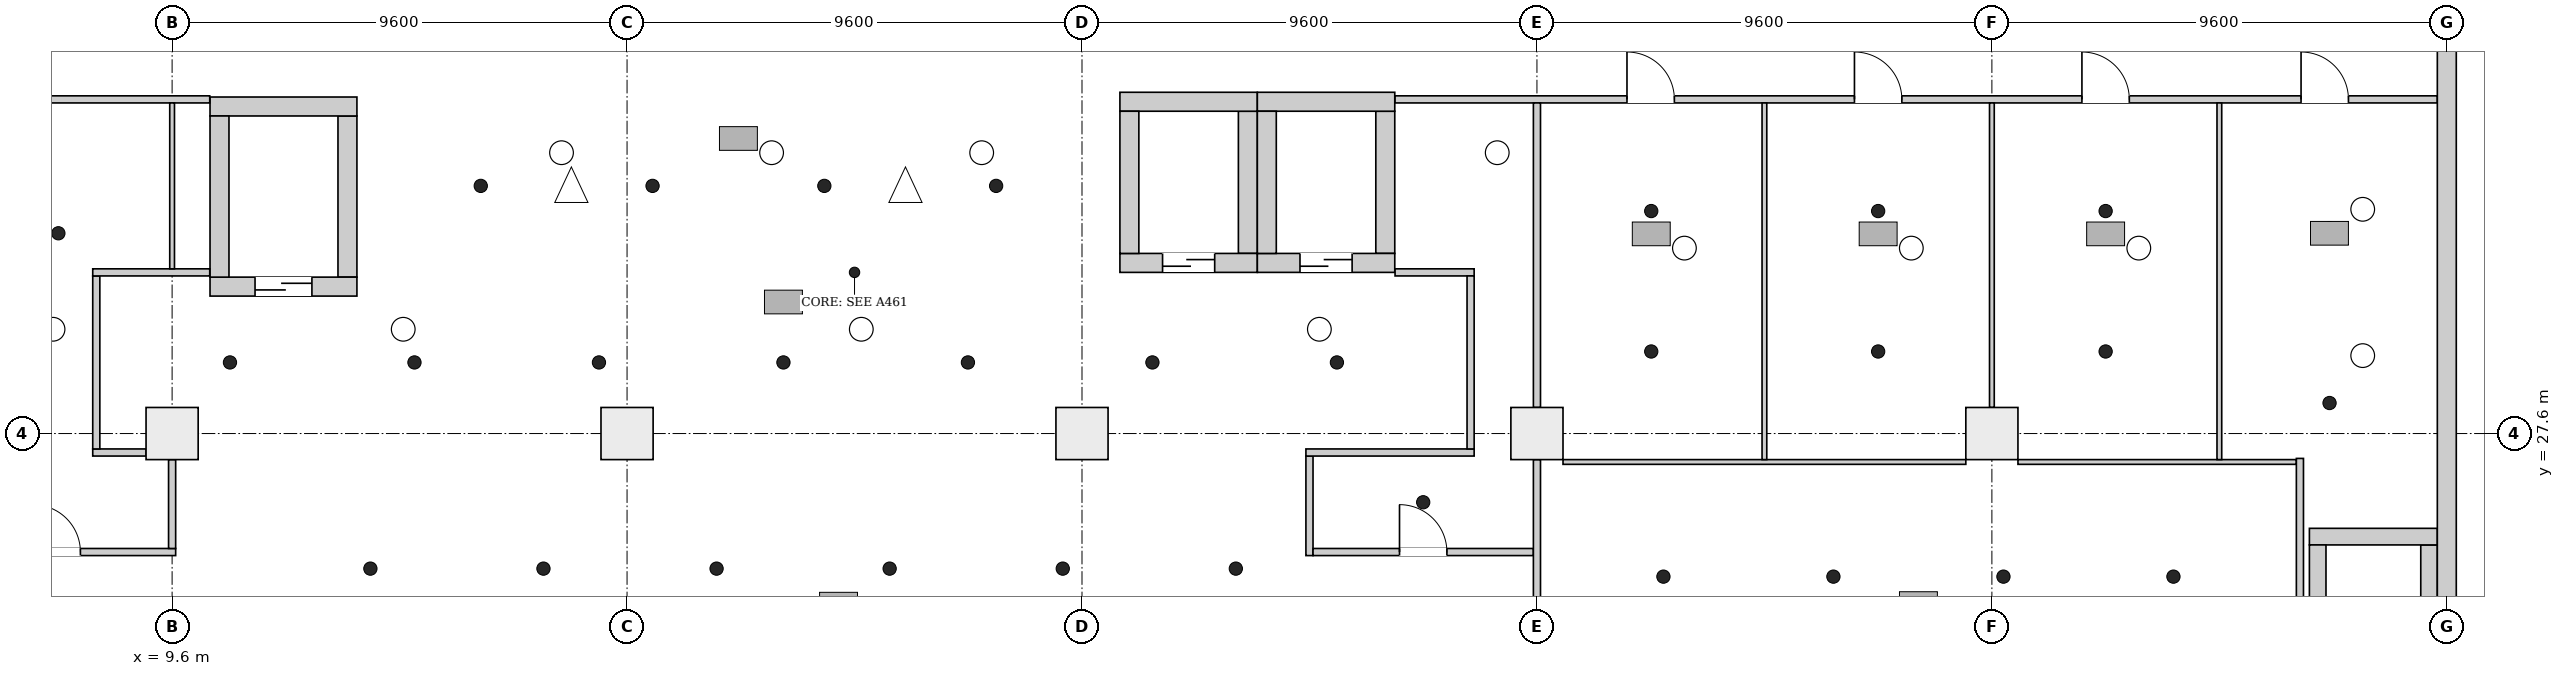
"""IFC4 building model, lengths in metres.
Left out: names, types, materials, properties, quantities, classifications, styles, units other than length and angle.
Written with IfcOpenShell. Run it as: python <this file> out.ifc"""

import sys

from ifc_helpers import new_model, si_unit, direction, frame, frame_2d, origin, origin_2d, place, context, subcontext, project, spatial, rectangle, extrude, element, fill, save


model = new_model("IFC4")
c1 = context("Model", 3, precision=1e-05, world=origin(), true_north=direction((0.0, 1.0)))
c2 = subcontext(c1, "Body", "Model", "MODEL_VIEW")
j1 = project(units=[si_unit("LENGTHUNIT", "METRE"), si_unit("PLANEANGLEUNIT", "RADIAN")], contexts=[c1])
p1 = place(None, origin())
s1 = spatial("IfcSite", under=j1, at=p1, CompositionType="ELEMENT")
p2 = place(p1, origin())
s2 = spatial("IfcBuilding", under=s1, at=p2, CompositionType="ELEMENT")
p3 = place(p2, frame((0.0, 0.0, 26.7)))
s3 = spatial("IfcBuildingStorey", under=s2, at=p3, CompositionType="ELEMENT", Elevation=26.7)
p4 = place(p3, frame((57.6, -0.2, 0.0), z_axis=(0.0, 0.0, 1.0), x_axis=(0.0, 1.0, 0.0)))
e1 = element("IfcWall", 1, at=p4, inside=s3, PredefinedType="SHEAR", context=c2, shape_type="SweptSolid", body=[
    extrude(rectangle(XDim=46.88, YDim=0.4, at=frame_2d((23.44, 0.0))), origin(), (0.0, 0.0, 1.0), 5.2),
])
p5 = place(p3, frame((54.7, 25.425, 0.0), z_axis=(0.0, 0.0, 1.0), x_axis=(1.0, 0.0, 0.0)))
e2 = element("IfcWall", 2, at=p5, inside=s3, PredefinedType="SHEAR", context=c2, shape_type="SweptSolid", body=[
    extrude(rectangle(XDim=2.7, YDim=0.35, at=frame_2d((1.35, 0.0))), origin(), (0.0, 0.0, 1.0), 5.2),
])
for number, where, z_axis, x_axis in (
    (3, (54.875, 21.75, 0.0), (0.0, 0.0, 1.0), (0.0, 1.0, 0.0)),
    (4, (57.225, 21.75, 0.0), (0.0, 0.0, 1.0), (0.0, 1.0, 0.0)),
):
    element("IfcWall", number, at=place(p3, frame(where, z_axis=z_axis, x_axis=x_axis)), inside=s3, PredefinedType="SHEAR", context=c2, shape_type="SweptSolid", body=[
        extrude(rectangle(XDim=3.5, YDim=0.35, at=frame_2d((1.75, 0.0))), origin(), (0.0, 0.0, 1.0), 5.2),
    ])
p6 = place(p3, frame((10.4, 30.7, 0.0), z_axis=(0.0, 0.0, 1.0), x_axis=(1.0, 0.0, 0.0)))
e5 = element("IfcWall", 5, at=p6, inside=s3, PredefinedType="SHEAR", context=c2, shape_type="SweptSolid", body=[
    extrude(rectangle(XDim=3.1, YDim=0.4, at=frame_2d((1.55, 0.0))), origin(), (0.0, 0.0, 1.0), 5.2),
])
p7 = place(p6, frame((0.95, 0.0, 0.0)))
e6 = element("IfcOpeningElement", 6, at=p7, cuts=e5, PredefinedType="OPENING", context=c2, shape_type="SweptSolid", body=[
    extrude(rectangle(XDim=1.2, YDim=2.1, at=frame_2d((0.6, 1.05))), frame((0.0, 0.21, 0.0), z_axis=(0.0, -1.0, 0.0), x_axis=(1.0, 0.0, 0.0)), (0.0, 0.0, 1.0), 0.42),
])
p8 = place(p3, frame((10.4, 34.5, 0.0), z_axis=(0.0, 0.0, 1.0), x_axis=(1.0, 0.0, 0.0)))
e7 = element("IfcWall", 7, at=p8, inside=s3, PredefinedType="SHEAR", context=c2, shape_type="SweptSolid", body=[
    extrude(rectangle(XDim=3.1, YDim=0.4, at=frame_2d((1.55, 0.0))), origin(), (0.0, 0.0, 1.0), 5.2),
])
for number, where, z_axis, x_axis in (
    (8, (10.6, 30.9, 0.0), (0.0, 0.0, 1.0), (0.0, 1.0, 0.0)),
    (9, (13.3, 30.9, 0.0), (0.0, 0.0, 1.0), (0.0, 1.0, 0.0)),
):
    element("IfcWall", number, at=place(p3, frame(where, z_axis=z_axis, x_axis=x_axis)), inside=s3, PredefinedType="SHEAR", context=c2, shape_type="SweptSolid", body=[
        extrude(rectangle(XDim=3.4, YDim=0.4, at=frame_2d((1.7, 0.0))), origin(), (0.0, 0.0, 1.0), 5.2),
    ])
p9 = place(p3, frame((29.6, 31.2, 0.0), z_axis=(0.0, 0.0, 1.0), x_axis=(1.0, 0.0, 0.0)))
e10 = element("IfcWall", 10, at=p9, inside=s3, PredefinedType="SHEAR", context=c2, shape_type="SweptSolid", body=[
    extrude(rectangle(XDim=2.9, YDim=0.4, at=frame_2d((1.45, 0.0))), origin(), (0.0, 0.0, 1.0), 5.2),
])
p10 = place(p9, frame((0.9, 0.0, 0.0)))
e11 = element("IfcOpeningElement", 11, at=p10, cuts=e10, PredefinedType="OPENING", context=c2, shape_type="SweptSolid", body=[
    extrude(rectangle(XDim=1.1, YDim=2.1, at=frame_2d((0.55, 1.05))), frame((0.0, 0.21, 0.0), z_axis=(0.0, -1.0, 0.0), x_axis=(1.0, 0.0, 0.0)), (0.0, 0.0, 1.0), 0.42),
])
p11 = place(p3, frame((29.6, 34.6, 0.0), z_axis=(0.0, 0.0, 1.0), x_axis=(1.0, 0.0, 0.0)))
e12 = element("IfcWall", 12, at=p11, inside=s3, PredefinedType="SHEAR", context=c2, shape_type="SweptSolid", body=[
    extrude(rectangle(XDim=2.9, YDim=0.4, at=frame_2d((1.45, 0.0))), origin(), (0.0, 0.0, 1.0), 5.2),
])
for number, where, z_axis, x_axis in (
    (13, (29.8, 31.4, 0.0), (0.0, 0.0, 1.0), (0.0, 1.0, 0.0)),
    (14, (32.3, 31.4, 0.0), (0.0, 0.0, 1.0), (0.0, 1.0, 0.0)),
):
    element("IfcWall", number, at=place(p3, frame(where, z_axis=z_axis, x_axis=x_axis)), inside=s3, PredefinedType="SHEAR", context=c2, shape_type="SweptSolid", body=[
        extrude(rectangle(XDim=3.0, YDim=0.4, at=frame_2d((1.5, 0.0))), origin(), (0.0, 0.0, 1.0), 5.2),
    ])
p12 = place(p3, frame((32.5, 31.2, 0.0), z_axis=(0.0, 0.0, 1.0), x_axis=(1.0, 0.0, 0.0)))
e15 = element("IfcWall", 15, at=p12, inside=s3, PredefinedType="SHEAR", context=c2, shape_type="SweptSolid", body=[
    extrude(rectangle(XDim=2.9, YDim=0.4, at=frame_2d((1.45, 0.0))), origin(), (0.0, 0.0, 1.0), 5.2),
])
p13 = place(p12, frame((0.9, 0.0, 0.0)))
e16 = element("IfcOpeningElement", 16, at=p13, cuts=e15, PredefinedType="OPENING", context=c2, shape_type="SweptSolid", body=[
    extrude(rectangle(XDim=1.1, YDim=2.1, at=frame_2d((0.55, 1.05))), frame((0.0, 0.21, 0.0), z_axis=(0.0, -1.0, 0.0), x_axis=(1.0, 0.0, 0.0)), (0.0, 0.0, 1.0), 0.42),
])
p14 = place(p3, frame((32.5, 34.6, 0.0), z_axis=(0.0, 0.0, 1.0), x_axis=(1.0, 0.0, 0.0)))
e17 = element("IfcWall", 17, at=p14, inside=s3, PredefinedType="SHEAR", context=c2, shape_type="SweptSolid", body=[
    extrude(rectangle(XDim=2.9, YDim=0.4, at=frame_2d((1.45, 0.0))), origin(), (0.0, 0.0, 1.0), 5.2),
])
for number, where, z_axis, x_axis in (
    (18, (32.7, 31.4, 0.0), (0.0, 0.0, 1.0), (0.0, 1.0, 0.0)),
    (19, (35.2, 31.4, 0.0), (0.0, 0.0, 1.0), (0.0, 1.0, 0.0)),
):
    element("IfcWall", number, at=place(p3, frame(where, z_axis=z_axis, x_axis=x_axis)), inside=s3, PredefinedType="SHEAR", context=c2, shape_type="SweptSolid", body=[
        extrude(rectangle(XDim=3.0, YDim=0.4, at=frame_2d((1.5, 0.0))), origin(), (0.0, 0.0, 1.0), 5.2),
    ])
for number, where, z_axis, x_axis in (
    (20, (9.6, 27.6, 0.0), (0.0, 0.0, 1.0), (1.0, 0.0, 0.0)),
    (21, (19.2, 27.6, 0.0), (0.0, 0.0, 1.0), (1.0, 0.0, 0.0)),
    (22, (28.8, 27.6, 0.0), (0.0, 0.0, 1.0), (1.0, 0.0, 0.0)),
    (23, (38.4, 27.6, 0.0), (0.0, 0.0, 1.0), (1.0, 0.0, 0.0)),
    (24, (48.0, 27.6, 0.0), (0.0, 0.0, 1.0), (1.0, 0.0, 0.0)),
):
    element("IfcColumn", number, at=place(p3, frame(where, z_axis=z_axis, x_axis=x_axis)), inside=s3, PredefinedType="COLUMN", context=c2, shape_type="SweptSolid", body=[
        extrude(rectangle(XDim=1.1, YDim=1.1, at=origin_2d()), origin(), (0.0, 0.0, 1.0), 5.2),
    ])
p15 = place(p3, frame((0.206, 25.1, 0.0), z_axis=(0.0, 0.0, 1.0), x_axis=(1.0, 0.0, 0.0)))
e25 = element("IfcWall", 25, at=p15, inside=s3, PredefinedType="PARTITIONING", context=c2, shape_type="SweptSolid", body=[
    extrude(rectangle(XDim=9.469, YDim=0.15, at=frame_2d((4.734, 0.0))), origin(), (0.0, 0.0, 1.0), 4.85),
])
p16 = place(p15, frame((1.869, 0.0, 0.0)))
e26 = element("IfcOpeningElement", 26, at=p16, cuts=e25, PredefinedType="OPENING", context=c2, shape_type="SweptSolid", body=[
    extrude(rectangle(XDim=1.0, YDim=2.1, at=frame_2d((0.5, 1.05))), frame((0.0, 0.085, 0.0), z_axis=(0.0, -1.0, 0.0), x_axis=(1.0, 0.0, 0.0)), (0.0, 0.0, 1.0), 0.17),
])
p17 = place(p15, frame((6.459, 0.0, 0.0)))
e27 = element("IfcOpeningElement", 27, at=p17, cuts=e25, PredefinedType="OPENING", context=c2, shape_type="SweptSolid", body=[
    extrude(rectangle(XDim=1.0, YDim=2.1, at=frame_2d((0.5, 1.05))), frame((0.0, 0.085, 0.0), z_axis=(0.0, -1.0, 0.0), x_axis=(1.0, 0.0, 0.0)), (0.0, 0.0, 1.0), 0.17),
])
p18 = place(p3, frame((2.706, 34.65, 0.0), z_axis=(0.0, 0.0, 1.0), x_axis=(1.0, 0.0, 0.0)))
e28 = element("IfcWall", 28, at=p18, inside=s3, PredefinedType="PARTITIONING", context=c2, shape_type="SweptSolid", body=[
    extrude(rectangle(XDim=7.688, YDim=0.15, at=frame_2d((3.844, 0.0))), origin(), (0.0, 0.0, 1.0), 4.85),
])
p19 = place(p3, frame((7.925, 27.2, 0.0), z_axis=(0.0, 0.0, 1.0), x_axis=(1.0, 0.0, 0.0)))
e29 = element("IfcWall", 29, at=p19, inside=s3, PredefinedType="PARTITIONING", context=c2, shape_type="SweptSolid", body=[
    extrude(rectangle(XDim=1.125, YDim=0.15, at=frame_2d((0.562, 0.0))), origin(), (0.0, 0.0, 1.0), 4.85),
])
p20 = place(p3, frame((8.0, 27.275, 0.0), z_axis=(0.0, 0.0, 1.0), x_axis=(0.0, 1.0, 0.0)))
e30 = element("IfcWall", 30, at=p20, inside=s3, PredefinedType="PARTITIONING", context=c2, shape_type="SweptSolid", body=[
    extrude(rectangle(XDim=3.65, YDim=0.15, at=frame_2d((1.825, 0.0))), origin(), (0.0, 0.0, 1.0), 4.85),
])
p21 = place(p3, frame((7.925, 31.0, 0.0), z_axis=(0.0, 0.0, 1.0), x_axis=(1.0, 0.0, 0.0)))
e31 = element("IfcWall", 31, at=p21, inside=s3, PredefinedType="PARTITIONING", context=c2, shape_type="SweptSolid", body=[
    extrude(rectangle(XDim=2.469, YDim=0.15, at=frame_2d((1.234, 0.0))), origin(), (0.0, 0.0, 1.0), 4.85),
])
p22 = place(p3, frame((9.6, 25.175, 0.0), z_axis=(0.0, 0.0, 1.0), x_axis=(0.0, 1.0, 0.0)))
e32 = element("IfcWall", 32, at=p22, inside=s3, PredefinedType="PARTITIONING", context=c2, shape_type="SweptSolid", body=[
    extrude(rectangle(XDim=1.875, YDim=0.15, at=frame_2d((0.938, 0.0))), origin(), (0.0, 0.0, 1.0), 4.45),
])
p23 = place(p3, frame((9.6, 31.075, 0.0), z_axis=(0.0, 0.0, 1.0), x_axis=(0.0, 1.0, 0.0)))
e33 = element("IfcWall", 33, at=p23, inside=s3, PredefinedType="PARTITIONING", context=c2, shape_type="SweptSolid", body=[
    extrude(rectangle(XDim=3.5, YDim=0.1, at=frame_2d((1.75, 0.0))), origin(), (0.0, 0.0, 1.0), 4.45),
])
p24 = place(p3, frame((33.6, 25.025, 0.0), z_axis=(0.0, 0.0, 1.0), x_axis=(0.0, 1.0, 0.0)))
e34 = element("IfcWall", 34, at=p24, inside=s3, PredefinedType="PARTITIONING", context=c2, shape_type="SweptSolid", body=[
    extrude(rectangle(XDim=2.1, YDim=0.15, at=frame_2d((1.05, 0.0))), origin(), (0.0, 0.0, 1.0), 4.85),
])
p25 = place(p3, frame((33.525, 27.2, 0.0), z_axis=(0.0, 0.0, 1.0), x_axis=(1.0, 0.0, 0.0)))
e35 = element("IfcWall", 35, at=p25, inside=s3, PredefinedType="PARTITIONING", context=c2, shape_type="SweptSolid", body=[
    extrude(rectangle(XDim=3.55, YDim=0.15, at=frame_2d((1.775, 0.0))), origin(), (0.0, 0.0, 1.0), 4.85),
])
p26 = place(p3, frame((33.675, 25.1, 0.0), z_axis=(0.0, 0.0, 1.0), x_axis=(1.0, 0.0, 0.0)))
e36 = element("IfcWall", 36, at=p26, inside=s3, PredefinedType="PARTITIONING", context=c2, shape_type="SweptSolid", body=[
    extrude(rectangle(XDim=4.65, YDim=0.15, at=frame_2d((2.325, 0.0))), origin(), (0.0, 0.0, 1.0), 4.85),
])
p27 = place(p26, frame((1.825, 0.0, 0.0)))
e37 = element("IfcOpeningElement", 37, at=p27, cuts=e36, PredefinedType="OPENING", context=c2, shape_type="SweptSolid", body=[
    extrude(rectangle(XDim=1.0, YDim=2.1, at=frame_2d((0.5, 1.05))), frame((0.0, 0.085, 0.0), z_axis=(0.0, -1.0, 0.0), x_axis=(1.0, 0.0, 0.0)), (0.0, 0.0, 1.0), 0.17),
])
p28 = place(p3, frame((35.406, 31.0, 0.0), z_axis=(0.0, 0.0, 1.0), x_axis=(1.0, 0.0, 0.0)))
e38 = element("IfcWall", 38, at=p28, inside=s3, PredefinedType="PARTITIONING", context=c2, shape_type="SweptSolid", body=[
    extrude(rectangle(XDim=1.669, YDim=0.15, at=frame_2d((0.834, 0.0))), origin(), (0.0, 0.0, 1.0), 4.85),
])
p29 = place(p3, frame((35.406, 34.65, 0.0), z_axis=(0.0, 0.0, 1.0), x_axis=(1.0, 0.0, 0.0)))
e39 = element("IfcWall", 39, at=p29, inside=s3, PredefinedType="PARTITIONING", context=c2, shape_type="SweptSolid", body=[
    extrude(rectangle(XDim=21.988, YDim=0.15, at=frame_2d((10.994, 0.0))), origin(), (0.0, 0.0, 1.0), 4.85),
])
p30 = place(p29, frame((4.894, 0.0, 0.0)))
e40 = element("IfcOpeningElement", 40, at=p30, cuts=e39, PredefinedType="OPENING", context=c2, shape_type="SweptSolid", body=[
    extrude(rectangle(XDim=1.0, YDim=2.1, at=frame_2d((0.5, 1.05))), frame((0.0, 0.085, 0.0), z_axis=(0.0, -1.0, 0.0), x_axis=(1.0, 0.0, 0.0)), (0.0, 0.0, 1.0), 0.17),
])
p31 = place(p29, frame((9.694, 0.0, 0.0)))
e41 = element("IfcOpeningElement", 41, at=p31, cuts=e39, PredefinedType="OPENING", context=c2, shape_type="SweptSolid", body=[
    extrude(rectangle(XDim=1.0, YDim=2.1, at=frame_2d((0.5, 1.05))), frame((0.0, 0.085, 0.0), z_axis=(0.0, -1.0, 0.0), x_axis=(1.0, 0.0, 0.0)), (0.0, 0.0, 1.0), 0.17),
])
p32 = place(p29, frame((14.494, 0.0, 0.0)))
e42 = element("IfcOpeningElement", 42, at=p32, cuts=e39, PredefinedType="OPENING", context=c2, shape_type="SweptSolid", body=[
    extrude(rectangle(XDim=1.0, YDim=2.1, at=frame_2d((0.5, 1.05))), frame((0.0, 0.085, 0.0), z_axis=(0.0, -1.0, 0.0), x_axis=(1.0, 0.0, 0.0)), (0.0, 0.0, 1.0), 0.17),
])
p33 = place(p29, frame((19.118, 0.0, 0.0)))
e43 = element("IfcOpeningElement", 43, at=p33, cuts=e39, PredefinedType="OPENING", context=c2, shape_type="SweptSolid", body=[
    extrude(rectangle(XDim=1.0, YDim=2.1, at=frame_2d((0.5, 1.05))), frame((0.0, 0.085, 0.0), z_axis=(0.0, -1.0, 0.0), x_axis=(1.0, 0.0, 0.0)), (0.0, 0.0, 1.0), 0.17),
])
p34 = place(p3, frame((37.0, 27.275, 0.0), z_axis=(0.0, 0.0, 1.0), x_axis=(0.0, 1.0, 0.0)))
e44 = element("IfcWall", 44, at=p34, inside=s3, PredefinedType="PARTITIONING", context=c2, shape_type="SweptSolid", body=[
    extrude(rectangle(XDim=3.65, YDim=0.15, at=frame_2d((1.825, 0.0))), origin(), (0.0, 0.0, 1.0), 4.85),
])
p35 = place(p3, frame((38.4, 18.95, 0.0), z_axis=(0.0, 0.0, 1.0), x_axis=(0.0, 1.0, 0.0)))
e45 = element("IfcWall", 45, at=p35, inside=s3, PredefinedType="PARTITIONING", context=c2, shape_type="SweptSolid", body=[
    extrude(rectangle(XDim=8.1, YDim=0.15, at=frame_2d((4.05, 0.0))), origin(), (0.0, 0.0, 1.0), 4.45),
])
p36 = place(p35, frame((3.55, 0.0, 0.0)))
e46 = element("IfcOpeningElement", 46, at=p36, cuts=e45, PredefinedType="OPENING", context=c2, shape_type="SweptSolid", body=[
    extrude(rectangle(XDim=1.0, YDim=2.1, at=frame_2d((0.5, 1.05))), frame((0.0, 0.085, 0.0), z_axis=(0.0, -1.0, 0.0), x_axis=(1.0, 0.0, 0.0)), (0.0, 0.0, 1.0), 0.17),
])
p37 = place(p3, frame((38.4, 28.15, 0.0), z_axis=(0.0, 0.0, 1.0), x_axis=(0.0, 1.0, 0.0)))
e47 = element("IfcWall", 47, at=p37, inside=s3, PredefinedType="PARTITIONING", context=c2, shape_type="SweptSolid", body=[
    extrude(rectangle(XDim=6.425, YDim=0.15, at=frame_2d((3.212, 0.0))), origin(), (0.0, 0.0, 1.0), 4.45),
])
p38 = place(p3, frame((38.95, 27.0, 0.0), z_axis=(0.0, 0.0, 1.0), x_axis=(1.0, 0.0, 0.0)))
e48 = element("IfcWall", 48, at=p38, inside=s3, PredefinedType="PARTITIONING", context=c2, shape_type="SweptSolid", body=[
    extrude(rectangle(XDim=8.5, YDim=0.1, at=frame_2d((4.25, 0.0))), origin(), (0.0, 0.0, 1.0), 4.85),
])
p39 = place(p3, frame((43.2, 27.05, 0.0), z_axis=(0.0, 0.0, 1.0), x_axis=(0.0, 1.0, 0.0)))
e49 = element("IfcWall", 49, at=p39, inside=s3, PredefinedType="PARTITIONING", context=c2, shape_type="SweptSolid", body=[
    extrude(rectangle(XDim=7.525, YDim=0.1, at=frame_2d((3.762, 0.0))), origin(), (0.0, 0.0, 1.0), 4.85),
])
p40 = place(p3, frame((48.0, 28.15, 0.0), z_axis=(0.0, 0.0, 1.0), x_axis=(0.0, 1.0, 0.0)))
e50 = element("IfcWall", 50, at=p40, inside=s3, PredefinedType="PARTITIONING", context=c2, shape_type="SweptSolid", body=[
    extrude(rectangle(XDim=6.425, YDim=0.1, at=frame_2d((3.212, 0.0))), origin(), (0.0, 0.0, 1.0), 4.85),
])
p41 = place(p3, frame((48.55, 27.0, 0.0), z_axis=(0.0, 0.0, 1.0), x_axis=(1.0, 0.0, 0.0)))
e51 = element("IfcWall", 51, at=p41, inside=s3, PredefinedType="PARTITIONING", context=c2, shape_type="SweptSolid", body=[
    extrude(rectangle(XDim=5.875, YDim=0.1, at=frame_2d((2.938, 0.0))), origin(), (0.0, 0.0, 1.0), 4.85),
])
p42 = place(p3, frame((52.8, 27.05, 0.0), z_axis=(0.0, 0.0, 1.0), x_axis=(0.0, 1.0, 0.0)))
e52 = element("IfcWall", 52, at=p42, inside=s3, PredefinedType="PARTITIONING", context=c2, shape_type="SweptSolid", body=[
    extrude(rectangle(XDim=7.525, YDim=0.1, at=frame_2d((3.762, 0.0))), origin(), (0.0, 0.0, 1.0), 4.85),
])
p43 = place(p3, frame((54.5, 19.075, 0.0), z_axis=(0.0, 0.0, 1.0), x_axis=(0.0, 1.0, 0.0)))
e53 = element("IfcWall", 53, at=p43, inside=s3, PredefinedType="PARTITIONING", context=c2, shape_type="SweptSolid", body=[
    extrude(rectangle(XDim=8.0, YDim=0.15, at=frame_2d((4.0, 0.0))), origin(), (0.0, 0.0, 1.0), 4.85),
])
p44 = place(p7, origin())
e54 = element("IfcDoor", 54, at=p44, inside=s3, OperationType="DOUBLE_DOOR_SLIDING", PredefinedType="DOOR", context=c2, shape_type="SweptSolid", body=[
    extrude(rectangle(XDim=1.2, YDim=2.1, at=frame_2d((0.6, 1.05))), frame((0.0, 0.025, 0.0), z_axis=(0.0, -1.0, 0.0), x_axis=(1.0, 0.0, 0.0)), (0.0, 0.0, 1.0), 0.05),
])
fill(e6, e54)
p45 = place(p10, origin())
e55 = element("IfcDoor", 55, at=p45, inside=s3, OperationType="DOUBLE_DOOR_SLIDING", PredefinedType="DOOR", context=c2, shape_type="SweptSolid", body=[
    extrude(rectangle(XDim=1.1, YDim=2.1, at=frame_2d((0.55, 1.05))), frame((0.0, 0.025, 0.0), z_axis=(0.0, -1.0, 0.0), x_axis=(1.0, 0.0, 0.0)), (0.0, 0.0, 1.0), 0.05),
])
fill(e11, e55)
p46 = place(p13, origin())
e56 = element("IfcDoor", 56, at=p46, inside=s3, OperationType="DOUBLE_DOOR_SLIDING", PredefinedType="DOOR", context=c2, shape_type="SweptSolid", body=[
    extrude(rectangle(XDim=1.1, YDim=2.1, at=frame_2d((0.55, 1.05))), frame((0.0, 0.025, 0.0), z_axis=(0.0, -1.0, 0.0), x_axis=(1.0, 0.0, 0.0)), (0.0, 0.0, 1.0), 0.05),
])
fill(e16, e56)
p47 = place(p17, origin())
e57 = element("IfcDoor", 57, at=p47, inside=s3, OperationType="SINGLE_SWING_RIGHT", PredefinedType="DOOR", context=c2, shape_type="SweptSolid", body=[
    extrude(rectangle(XDim=1.0, YDim=2.1, at=frame_2d((0.5, 1.05))), frame((0.0, 0.025, 0.0), z_axis=(0.0, -1.0, 0.0), x_axis=(1.0, 0.0, 0.0)), (0.0, 0.0, 1.0), 0.05),
])
fill(e27, e57)
p48 = place(p27, origin())
e58 = element("IfcDoor", 58, at=p48, inside=s3, OperationType="SINGLE_SWING_LEFT", PredefinedType="DOOR", context=c2, shape_type="SweptSolid", body=[
    extrude(rectangle(XDim=1.0, YDim=2.1, at=frame_2d((0.5, 1.05))), frame((0.0, 0.025, 0.0), z_axis=(0.0, -1.0, 0.0), x_axis=(1.0, 0.0, 0.0)), (0.0, 0.0, 1.0), 0.05),
])
fill(e37, e58)
p49 = place(p30, origin())
e59 = element("IfcDoor", 59, at=p49, inside=s3, OperationType="SINGLE_SWING_RIGHT", PredefinedType="DOOR", context=c2, shape_type="SweptSolid", body=[
    extrude(rectangle(XDim=1.0, YDim=2.1, at=frame_2d((0.5, 1.05))), frame((0.0, 0.025, 0.0), z_axis=(0.0, -1.0, 0.0), x_axis=(1.0, 0.0, 0.0)), (0.0, 0.0, 1.0), 0.05),
])
fill(e40, e59)
p50 = place(p31, origin())
e60 = element("IfcDoor", 60, at=p50, inside=s3, OperationType="SINGLE_SWING_RIGHT", PredefinedType="DOOR", context=c2, shape_type="SweptSolid", body=[
    extrude(rectangle(XDim=1.0, YDim=2.1, at=frame_2d((0.5, 1.05))), frame((0.0, 0.025, 0.0), z_axis=(0.0, -1.0, 0.0), x_axis=(1.0, 0.0, 0.0)), (0.0, 0.0, 1.0), 0.05),
])
fill(e41, e60)
p51 = place(p32, origin())
e61 = element("IfcDoor", 61, at=p51, inside=s3, OperationType="SINGLE_SWING_LEFT", PredefinedType="DOOR", context=c2, shape_type="SweptSolid", body=[
    extrude(rectangle(XDim=1.0, YDim=2.1, at=frame_2d((0.5, 1.05))), frame((0.0, 0.025, 0.0), z_axis=(0.0, -1.0, 0.0), x_axis=(1.0, 0.0, 0.0)), (0.0, 0.0, 1.0), 0.05),
])
fill(e42, e61)
p52 = place(p33, origin())
e62 = element("IfcDoor", 62, at=p52, inside=s3, OperationType="SINGLE_SWING_LEFT", PredefinedType="DOOR", context=c2, shape_type="SweptSolid", body=[
    extrude(rectangle(XDim=1.0, YDim=2.1, at=frame_2d((0.5, 1.05))), frame((0.0, 0.025, 0.0), z_axis=(0.0, -1.0, 0.0), x_axis=(1.0, 0.0, 0.0)), (0.0, 0.0, 1.0), 0.05),
])
fill(e43, e62)
save(model, sys.argv[1])
